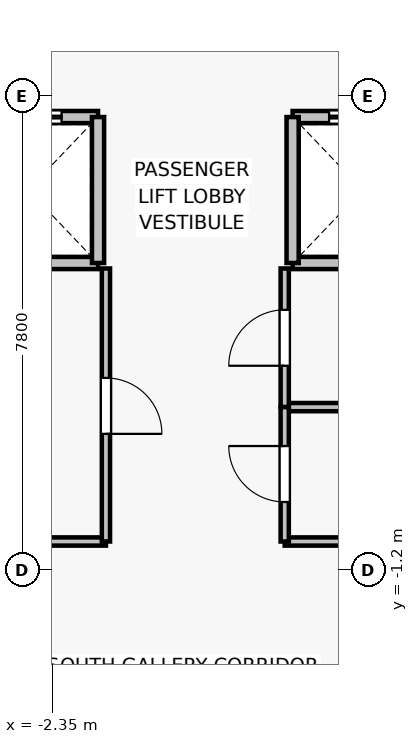
"""IFC4 building model, lengths in metres.
Left out: names, types, materials, properties, quantities, classifications, styles, units other than length and angle.
Written with IfcOpenShell. Run it as: python <this file> out.ifc"""

import sys

from ifc_helpers import new_model, si_unit, direction, frame, frame_2d, origin, place, context, subcontext, project, spatial, rectangle, extrude, source, transform, mapped, element, fill, save


model = new_model("IFC4")
c1 = context("Model", 3, precision=1e-05, world=origin(), true_north=direction((0.0, 1.0)))
c2 = subcontext(c1, "Body", "Model", "MODEL_VIEW")
j1 = project(units=[si_unit("LENGTHUNIT", "METRE"), si_unit("PLANEANGLEUNIT", "RADIAN")], contexts=[c1])
p1 = place(None, origin())
s1 = spatial("IfcSite", under=j1, at=p1, CompositionType="ELEMENT")
p2 = place(p1, origin())
s2 = spatial("IfcBuilding", under=s1, at=p2, CompositionType="ELEMENT")
p3 = place(p2, frame((0.0, 0.0, 182.5)))
s3 = spatial("IfcBuildingStorey", under=s2, at=p3, CompositionType="ELEMENT", Elevation=182.5)
p4 = place(p3, frame((-1.6, 3.85, 0.0), z_axis=(0.0, 0.0, 1.0), x_axis=(-1.0, 0.0, 0.0)))
e1 = element("IfcWall", 1, at=p4, inside=s3, PredefinedType="SOLIDWALL", context=c2, shape_type="SweptSolid", body=[
    extrude(rectangle(XDim=2.3, YDim=0.2, at=frame_2d((1.15, 0.0))), origin(), (0.0, 0.0, 1.0), 3.075),
])
p5 = place(p3, frame((-3.9, 6.25, 0.0), z_axis=(0.0, 0.0, 1.0), x_axis=(1.0, 0.0, 0.0)))
e2 = element("IfcWall", 2, at=p5, inside=s3, PredefinedType="SOLIDWALL", context=c2, shape_type="SweptSolid", body=[
    extrude(rectangle(XDim=2.3, YDim=0.2, at=frame_2d((1.15, 0.0))), origin(), (0.0, 0.0, 1.0), 3.075),
])
p6 = place(p5, frame((0.6, 0.0, 0.0)))
e3 = element("IfcOpeningElement", 3, at=p6, cuts=e2, PredefinedType="OPENING", context=c2, shape_type="SweptSolid", body=[
    extrude(rectangle(XDim=1.1, YDim=2.2, at=frame_2d((0.55, 1.1))), frame((0.0, 0.11, 0.0), z_axis=(0.0, -1.0, 0.0), x_axis=(1.0, 0.0, 0.0)), (0.0, 0.0, 1.0), 0.22),
])
p7 = place(p3, frame((-1.6, 6.25, 0.0), z_axis=(0.0, 0.0, 1.0), x_axis=(0.0, -1.0, 0.0)))
e4 = element("IfcWall", 4, at=p7, inside=s3, PredefinedType="SOLIDWALL", context=c2, shape_type="SweptSolid", body=[
    extrude(rectangle(XDim=2.4, YDim=0.2, at=frame_2d((1.2, 0.0))), origin(), (0.0, 0.0, 1.0), 3.075),
])
p8 = place(p3, frame((3.9, 3.85, 0.0), z_axis=(0.0, 0.0, 1.0), x_axis=(-1.0, 0.0, 0.0)))
e5 = element("IfcWall", 5, at=p8, inside=s3, PredefinedType="SOLIDWALL", context=c2, shape_type="SweptSolid", body=[
    extrude(rectangle(XDim=2.3, YDim=0.2, at=frame_2d((1.15, 0.0))), origin(), (0.0, 0.0, 1.0), 3.075),
])
p9 = place(p3, frame((1.6, 6.25, 0.0), z_axis=(0.0, 0.0, 1.0), x_axis=(1.0, 0.0, 0.0)))
e6 = element("IfcWall", 6, at=p9, inside=s3, PredefinedType="SOLIDWALL", context=c2, shape_type="SweptSolid", body=[
    extrude(rectangle(XDim=2.3, YDim=0.2, at=frame_2d((1.15, 0.0))), origin(), (0.0, 0.0, 1.0), 3.075),
])
p10 = place(p9, frame((0.6, 0.0, 0.0)))
e7 = element("IfcOpeningElement", 7, at=p10, cuts=e6, PredefinedType="OPENING", context=c2, shape_type="SweptSolid", body=[
    extrude(rectangle(XDim=1.1, YDim=2.2, at=frame_2d((0.55, 1.1))), frame((0.0, 0.11, 0.0), z_axis=(0.0, -1.0, 0.0), x_axis=(1.0, 0.0, 0.0)), (0.0, 0.0, 1.0), 0.22),
])
p11 = place(p3, frame((1.6, 3.85, 0.0), z_axis=(0.0, 0.0, 1.0), x_axis=(0.0, 1.0, 0.0)))
e8 = element("IfcWall", 8, at=p11, inside=s3, PredefinedType="SOLIDWALL", context=c2, shape_type="SweptSolid", body=[
    extrude(rectangle(XDim=2.4, YDim=0.2, at=frame_2d((1.2, 0.0))), origin(), (0.0, 0.0, 1.0), 3.075),
])
p12 = place(p3, frame((-1.47, -0.73, 0.0), z_axis=(0.0, 0.0, 1.0), x_axis=(-1.0, 0.0, 0.0)))
e9 = element("IfcWall", 9, at=p12, inside=s3, PredefinedType="PARTITIONING", context=c2, shape_type="SweptSolid", body=[
    extrude(rectangle(XDim=5.11, YDim=0.135, at=frame_2d((2.555, 0.0))), origin(), (0.0, 0.0, 1.0), 3.075),
])
p13 = place(p3, frame((-1.47, 3.76, 0.0), z_axis=(0.0, 0.0, 1.0), x_axis=(0.0, -1.0, 0.0)))
e10 = element("IfcWall", 10, at=p13, inside=s3, PredefinedType="PARTITIONING", context=c2, shape_type="SweptSolid", body=[
    extrude(rectangle(XDim=4.49, YDim=0.135, at=frame_2d((2.245, 0.0))), origin(), (0.0, 0.0, 1.0), 3.075),
])
p14 = place(p13, frame((1.8, 0.0, 0.0)))
e11 = element("IfcOpeningElement", 11, at=p14, cuts=e10, PredefinedType="OPENING", context=c2, shape_type="SweptSolid", body=[
    extrude(rectangle(XDim=0.92, YDim=2.1, at=frame_2d((0.46, 1.05))), frame((0.0, 0.077, 0.0), z_axis=(0.0, -1.0, 0.0), x_axis=(1.0, 0.0, 0.0)), (0.0, 0.0, 1.0), 0.155),
])
p15 = place(p3, frame((6.58, 1.48, 0.0), z_axis=(0.0, 0.0, 1.0), x_axis=(-1.0, 0.0, 0.0)))
e12 = element("IfcWall", 12, at=p15, inside=s3, PredefinedType="PARTITIONING", context=c2, shape_type="SweptSolid", body=[
    extrude(rectangle(XDim=5.11, YDim=0.135, at=frame_2d((2.555, 0.0))), origin(), (0.0, 0.0, 1.0), 3.075),
])
p16 = place(p3, frame((1.47, 1.48, 0.0), z_axis=(0.0, 0.0, 1.0), x_axis=(0.0, 1.0, 0.0)))
e13 = element("IfcWall", 13, at=p16, inside=s3, PredefinedType="PARTITIONING", context=c2, shape_type="SweptSolid", body=[
    extrude(rectangle(XDim=2.28, YDim=0.135, at=frame_2d((1.14, 0.0))), origin(), (0.0, 0.0, 1.0), 3.075),
])
p17 = place(p16, frame((0.68, 0.0, 0.0)))
e14 = element("IfcOpeningElement", 14, at=p17, cuts=e13, PredefinedType="OPENING", context=c2, shape_type="SweptSolid", body=[
    extrude(rectangle(XDim=0.92, YDim=2.1, at=frame_2d((0.46, 1.05))), frame((0.0, 0.077, 0.0), z_axis=(0.0, -1.0, 0.0), x_axis=(1.0, 0.0, 0.0)), (0.0, 0.0, 1.0), 0.155),
])
p18 = place(p3, frame((4.18, -0.73, 0.0), z_axis=(0.0, 0.0, 1.0), x_axis=(-1.0, 0.0, 0.0)))
e15 = element("IfcWall", 15, at=p18, inside=s3, PredefinedType="PARTITIONING", context=c2, shape_type="SweptSolid", body=[
    extrude(rectangle(XDim=2.71, YDim=0.135, at=frame_2d((1.355, 0.0))), origin(), (0.0, 0.0, 1.0), 3.075),
])
p19 = place(p3, frame((1.47, -0.73, 0.0), z_axis=(0.0, 0.0, 1.0), x_axis=(0.0, 1.0, 0.0)))
e16 = element("IfcWall", 16, at=p19, inside=s3, PredefinedType="PARTITIONING", context=c2, shape_type="SweptSolid", body=[
    extrude(rectangle(XDim=2.21, YDim=0.135, at=frame_2d((1.105, 0.0))), origin(), (0.0, 0.0, 1.0), 3.075),
])
p20 = place(p19, frame((0.65, 0.0, 0.0)))
e17 = element("IfcOpeningElement", 17, at=p20, cuts=e16, PredefinedType="OPENING", context=c2, shape_type="SweptSolid", body=[
    extrude(rectangle(XDim=0.92, YDim=2.1, at=frame_2d((0.46, 1.05))), frame((0.0, 0.077, 0.0), z_axis=(0.0, -1.0, 0.0), x_axis=(1.0, 0.0, 0.0)), (0.0, 0.0, 1.0), 0.155),
])
m1 = source(origin(), c2, "Body", "SweptSolid", [
    extrude(rectangle(XDim=1.1, YDim=2.2, at=frame_2d((0.55, 1.1))), frame((0.0, 0.025, 0.0), z_axis=(0.0, -1.0, 0.0), x_axis=(1.0, 0.0, 0.0)), (0.0, 0.0, 1.0), 0.05),
])
p21 = place(p6, origin())
e18 = element("IfcDoor", 18, at=p21, inside=s3, OperationType="DOUBLE_DOOR_SLIDING", PredefinedType="DOOR", context=c2, shape_type="MappedRepresentation", body=[
    mapped(m1, transform((0.0, 0.0, 0.0), x_axis=(1.0, 0.0, 0.0), y_axis=(0.0, 1.0, 0.0), z_axis=(0.0, 0.0, 1.0), scale=1.0)),
])
fill(e3, e18)
p22 = place(p10, origin())
e19 = element("IfcDoor", 19, at=p22, inside=s3, OperationType="DOUBLE_DOOR_SLIDING", PredefinedType="DOOR", context=c2, shape_type="MappedRepresentation", body=[
    mapped(m1, transform((0.0, 0.0, 0.0), x_axis=(1.0, 0.0, 0.0), y_axis=(0.0, 1.0, 0.0), z_axis=(0.0, 0.0, 1.0), scale=1.0)),
])
fill(e7, e19)
m2 = source(origin(), c2, "Body", "SweptSolid", [
    extrude(rectangle(XDim=0.92, YDim=2.1, at=frame_2d((0.46, 1.05))), frame((0.0, 0.025, 0.0), z_axis=(0.0, -1.0, 0.0), x_axis=(1.0, 0.0, 0.0)), (0.0, 0.0, 1.0), 0.05),
])
p23 = place(p14, origin())
e20 = element("IfcDoor", 20, at=p23, inside=s3, OperationType="SINGLE_SWING_RIGHT", PredefinedType="DOOR", context=c2, shape_type="MappedRepresentation", body=[
    mapped(m2, transform((0.0, 0.0, 0.0), x_axis=(1.0, 0.0, 0.0), y_axis=(0.0, 1.0, 0.0), z_axis=(0.0, 0.0, 1.0), scale=1.0)),
])
fill(e11, e20)
p24 = place(p17, origin())
e21 = element("IfcDoor", 21, at=p24, inside=s3, OperationType="SINGLE_SWING_LEFT", PredefinedType="DOOR", context=c2, shape_type="MappedRepresentation", body=[
    mapped(m2, transform((0.0, 0.0, 0.0), x_axis=(1.0, 0.0, 0.0), y_axis=(0.0, 1.0, 0.0), z_axis=(0.0, 0.0, 1.0), scale=1.0)),
])
fill(e14, e21)
p25 = place(p20, origin())
e22 = element("IfcDoor", 22, at=p25, inside=s3, OperationType="SINGLE_SWING_RIGHT", PredefinedType="DOOR", context=c2, shape_type="MappedRepresentation", body=[
    mapped(m2, transform((0.0, 0.0, 0.0), x_axis=(1.0, 0.0, 0.0), y_axis=(0.0, 1.0, 0.0), z_axis=(0.0, 0.0, 1.0), scale=1.0)),
])
fill(e17, e22)
save(model, sys.argv[1])
